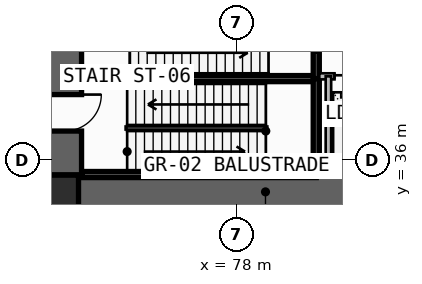
"""IFC4 building model, lengths in metres.
Left out: names, types, materials, properties, quantities, classifications, styles, units other than length and angle.
Written with IfcOpenShell. Run it as: python <this file> out.ifc"""

import sys

from ifc_helpers import new_model, si_unit, direction, frame, frame_2d, origin, origin_2d, place, context, subcontext, project, spatial, rectangle, extrude, element, fill, save


model = new_model("IFC4")
c1 = context("Model", 3, precision=1e-05, world=origin(), true_north=direction((0.0, 1.0)))
c2 = subcontext(c1, "Body", "Model", "MODEL_VIEW")
j1 = project(units=[si_unit("LENGTHUNIT", "METRE"), si_unit("PLANEANGLEUNIT", "RADIAN")], contexts=[c1])
p1 = place(None, origin())
s1 = spatial("IfcSite", under=j1, at=p1, CompositionType="ELEMENT")
p2 = place(p1, origin())
s2 = spatial("IfcBuilding", under=s1, at=p2, CompositionType="ELEMENT")
p3 = place(p2, frame((0.0, 0.0, -6.0)))
s3 = spatial("IfcBuildingStorey", under=s2, at=p3, CompositionType="ELEMENT", Elevation=-6.0)
p4 = place(p3, frame((72.35, 35.5, -0.6), z_axis=(0.0, 0.0, 1.0), x_axis=(0.0, 1.0, 0.0)))
e1 = element("IfcWall", 1, at=p4, inside=s3, PredefinedType="SHEAR", context=c2, shape_type="SweptSolid", body=[
    extrude(rectangle(XDim=7.85, YDim=1.1, at=frame_2d((3.925, 0.0))), origin(), (0.0, 0.0, 1.0), 6.2),
])
p5 = place(p4, frame((1.45, 0.0, 0.6)))
e2 = element("IfcOpeningElement", 2, at=p5, cuts=e1, PredefinedType="OPENING", context=c2, shape_type="SweptSolid", body=[
    extrude(rectangle(XDim=1.2, YDim=2.2, at=frame_2d((0.6, 1.1))), frame((0.0, 0.56, 0.0), z_axis=(0.0, -1.0, 0.0), x_axis=(1.0, 0.0, 0.0)), (0.0, 0.0, 1.0), 1.12),
])
p6 = place(p3, frame((71.8, 34.95, -0.6), z_axis=(0.0, 0.0, 1.0), x_axis=(1.0, 0.0, 0.0)))
e3 = element("IfcWall", 3, at=p6, inside=s3, PredefinedType="SHEAR", context=c2, shape_type="SweptSolid", body=[
    extrude(rectangle(XDim=14.3, YDim=1.1, at=frame_2d((7.15, 0.0))), origin(), (0.0, 0.0, 1.0), 6.2),
])
p7 = place(p3, frame((72.0, 34.7, -0.6), z_axis=(0.0, 0.0, 1.0), x_axis=(1.0, 0.0, 0.0)))
e4 = element("IfcColumn", 4, at=p7, inside=s3, PredefinedType="COLUMN", context=c2, shape_type="SweptSolid", body=[
    extrude(rectangle(XDim=1.6, YDim=1.6, at=origin_2d()), origin(), (0.0, 0.0, 1.0), 6.6),
])
for number, where, z_axis, x_axis in (
    (5, (72.92, 35.52, -0.6), (0.0, 0.0, 1.0), (1.0, 0.0, 0.0)),
    (6, (72.92, 38.675, -0.6), (0.0, 0.0, 1.0), (1.0, 0.0, 0.0)),
):
    element("IfcWall", number, at=place(p3, frame(where, z_axis=z_axis, x_axis=x_axis)), inside=s3, PredefinedType="SOLIDWALL", context=c2, shape_type="SweptSolid", body=[
        extrude(rectangle(XDim=7.7, YDim=0.2, at=frame_2d((3.85, 0.0))), origin(), (0.0, 0.0, 1.0), 6.2),
    ])
p8 = place(p3, frame((80.62, 35.52, -0.6), z_axis=(0.0, 0.0, 1.0), x_axis=(0.0, 1.0, 0.0)))
e7 = element("IfcWall", 7, at=p8, inside=s3, PredefinedType="SOLIDWALL", context=c2, shape_type="SweptSolid", body=[
    extrude(rectangle(XDim=3.155, YDim=0.2, at=frame_2d((1.578, 0.0))), origin(), (0.0, 0.0, 1.0), 6.2),
])
p9 = place(p3, frame((80.62, 38.675, -0.6), z_axis=(0.0, 0.0, 1.0), x_axis=(0.0, 1.0, 0.0)))
e8 = element("IfcWall", 8, at=p9, inside=s3, PredefinedType="SOLIDWALL", context=c2, shape_type="SweptSolid", body=[
    extrude(rectangle(XDim=3.245, YDim=0.2, at=frame_2d((1.623, 0.0))), origin(), (0.0, 0.0, 1.0), 6.2),
])
p10 = place(p9, frame((0.9, 0.0, 0.6)))
e9 = element("IfcOpeningElement", 9, at=p10, cuts=e8, PredefinedType="OPENING", context=c2, shape_type="SweptSolid", body=[
    extrude(rectangle(XDim=1.2, YDim=2.2, at=frame_2d((0.6, 1.1))), frame((0.0, 0.11, 0.0), z_axis=(0.0, -1.0, 0.0), x_axis=(1.0, 0.0, 0.0)), (0.0, 0.0, 1.0), 0.22),
])
p11 = place(p3, frame((80.72, 38.75, 0.0), z_axis=(0.0, 0.0, 1.0), x_axis=(1.0, 0.0, 0.0)))
e10 = element("IfcWall", 10, at=p11, inside=s3, PredefinedType="SOLIDWALL", context=c2, shape_type="SweptSolid", body=[
    extrude(rectangle(XDim=4.26, YDim=0.2, at=frame_2d((2.13, 0.0))), origin(), (0.0, 0.0, 1.0), 5.6),
])
p12 = place(p11, frame((0.5, 0.0, 0.0)))
e11 = element("IfcOpeningElement", 11, at=p12, cuts=e10, PredefinedType="OPENING", context=c2, shape_type="SweptSolid", body=[
    extrude(rectangle(XDim=1.3, YDim=2.3, at=frame_2d((0.65, 1.15))), frame((0.0, 0.11, 0.0), z_axis=(0.0, -1.0, 0.0), x_axis=(1.0, 0.0, 0.0)), (0.0, 0.0, 1.0), 0.22),
])
p13 = place(p11, frame((2.45, 0.0, 0.0)))
e12 = element("IfcOpeningElement", 12, at=p13, cuts=e10, PredefinedType="OPENING", context=c2, shape_type="SweptSolid", body=[
    extrude(rectangle(XDim=1.3, YDim=2.3, at=frame_2d((0.65, 1.15))), frame((0.0, 0.11, 0.0), z_axis=(0.0, -1.0, 0.0), x_axis=(1.0, 0.0, 0.0)), (0.0, 0.0, 1.0), 0.22),
])
p14 = place(p3, frame((81.02, 35.65, 0.0), z_axis=(0.0, 0.0, 1.0), x_axis=(0.0, 1.0, 0.0)))
e13 = element("IfcWall", 13, at=p14, inside=s3, PredefinedType="SOLIDWALL", context=c2, shape_type="SweptSolid", body=[
    extrude(rectangle(XDim=3.1, YDim=0.18, at=frame_2d((1.55, 0.0))), origin(), (0.0, 0.0, 1.0), 5.6),
])
p15 = place(p3, frame((81.02, 35.65, 0.0), z_axis=(0.0, 0.0, 1.0), x_axis=(1.0, 0.0, 0.0)))
e14 = element("IfcWall", 14, at=p15, inside=s3, PredefinedType="SOLIDWALL", context=c2, shape_type="SweptSolid", body=[
    extrude(rectangle(XDim=3.93, YDim=0.18, at=frame_2d((1.965, 0.0))), origin(), (0.0, 0.0, 1.0), 5.6),
])
p16 = place(p5, frame((1.2, 0.0, 0.0), z_axis=(0.0, 0.0, 1.0), x_axis=(-1.0, 0.0, 0.0)))
e15 = element("IfcDoor", 15, at=p16, inside=s3, OperationType="SINGLE_SWING_LEFT", PredefinedType="USERDEFINED", context=c2, shape_type="SweptSolid", body=[
    extrude(rectangle(XDim=1.2, YDim=2.2, at=frame_2d((0.6, 1.1))), frame((0.0, 0.025, 0.0), z_axis=(0.0, -1.0, 0.0), x_axis=(1.0, 0.0, 0.0)), (0.0, 0.0, 1.0), 0.05),
])
fill(e2, e15)
p17 = place(p12, origin())
e16 = element("IfcDoor", 16, at=p17, inside=s3, OperationType="DOUBLE_DOOR_SLIDING", PredefinedType="DOOR", context=c2, shape_type="SweptSolid", body=[
    extrude(rectangle(XDim=1.3, YDim=2.3, at=frame_2d((0.65, 1.15))), frame((0.0, 0.025, 0.0), z_axis=(0.0, -1.0, 0.0), x_axis=(1.0, 0.0, 0.0)), (0.0, 0.0, 1.0), 0.05),
])
fill(e11, e16)
save(model, sys.argv[1])
